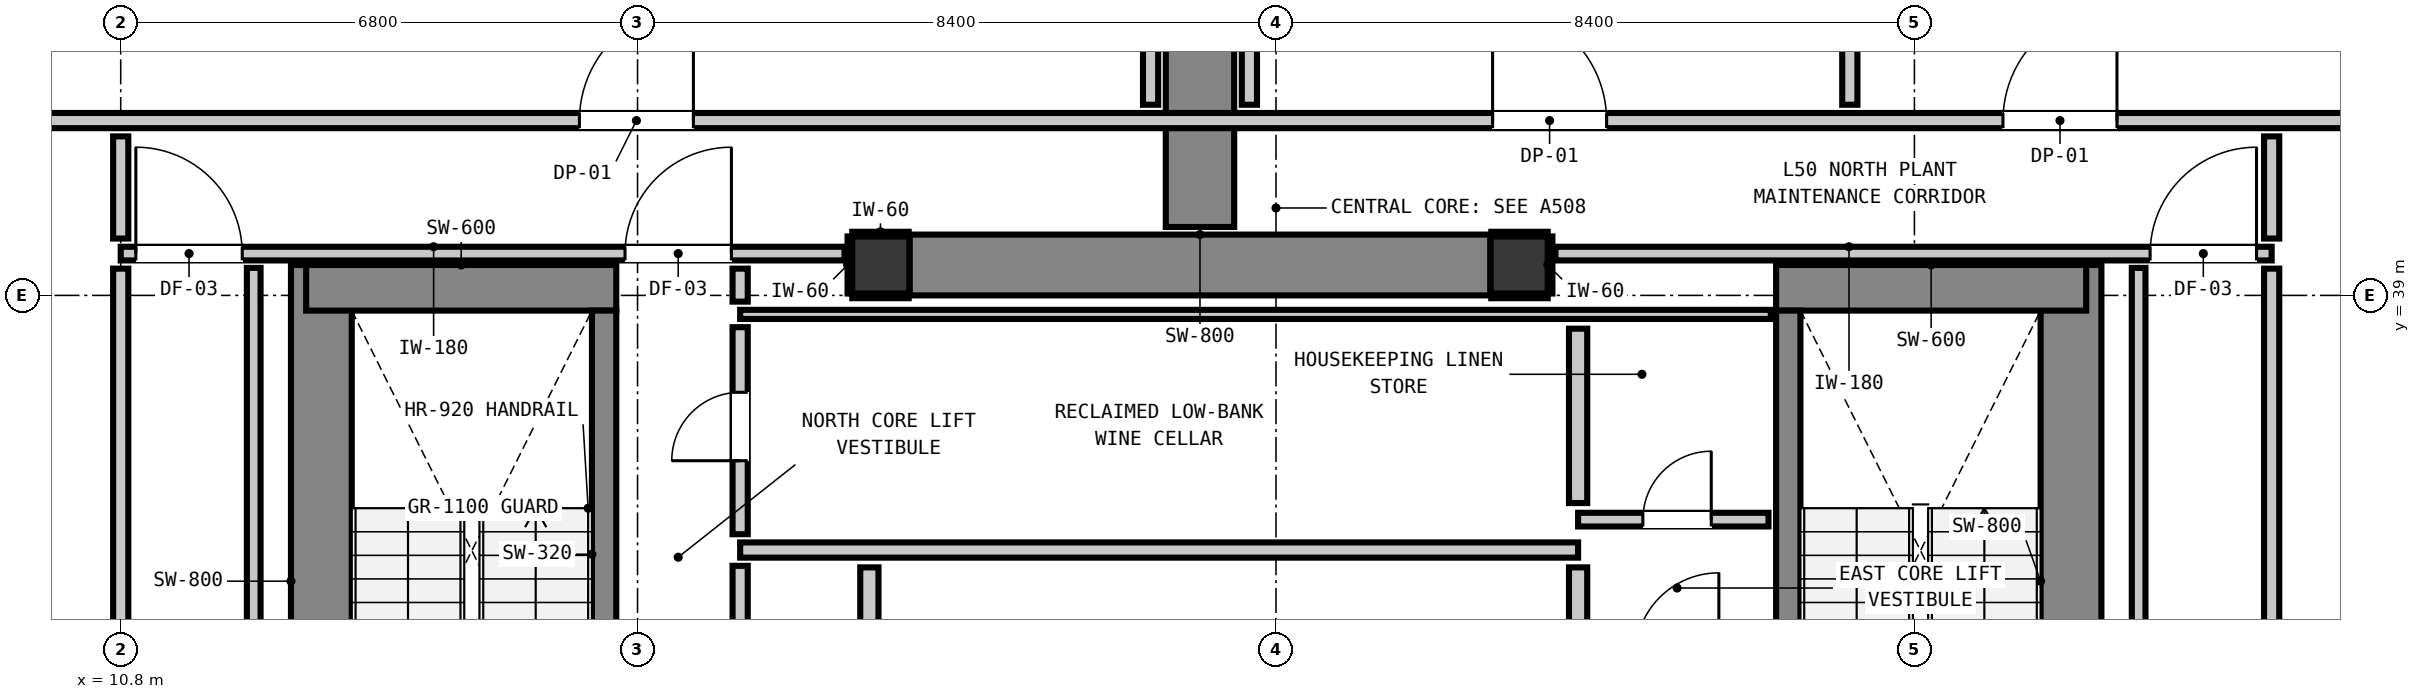
"""IFC4 building model, lengths in metres.
Left out: names, types, materials, properties, quantities, classifications, styles, units other than length and angle.
Written with IfcOpenShell. Run it as: python <this file> out.ifc"""

import sys

from ifc_helpers import new_model, si_unit, direction, frame, frame_2d, origin, origin_2d, place, context, subcontext, project, spatial, rectangle, extrude, element, fill, save


model = new_model("IFC4")
c1 = context("Model", 3, precision=1e-05, world=origin(), true_north=direction((0.0, 1.0)))
c2 = subcontext(c1, "Body", "Model", "MODEL_VIEW")
j1 = project(units=[si_unit("LENGTHUNIT", "METRE"), si_unit("PLANEANGLEUNIT", "RADIAN")], contexts=[c1])
p1 = place(None, origin())
s1 = spatial("IfcSite", under=j1, at=p1, CompositionType="ELEMENT")
p2 = place(p1, origin())
s2 = spatial("IfcBuilding", under=s1, at=p2, CompositionType="ELEMENT")
p3 = place(p2, frame((0.0, 0.0, 172.48)))
s3 = spatial("IfcBuildingStorey", under=s2, at=p3, CompositionType="ELEMENT", Elevation=172.48)
for number, where, z_axis, x_axis in (
    (1, (20.8, 39.4, 0.0), (0.0, 0.0, 1.0), (1.0, 0.0, 0.0)),
    (2, (29.2, 39.4, 0.0), (0.0, 0.0, 1.0), (1.0, 0.0, 0.0)),
):
    element("IfcColumn", number, at=place(p3, frame(where, z_axis=z_axis, x_axis=x_axis)), inside=s3, PredefinedType="COLUMN", context=c2, shape_type="SweptSolid", body=[
        extrude(rectangle(XDim=0.75, YDim=0.75, at=origin_2d()), origin(), (0.0, 0.0, 1.0), 4.4),
    ])
p4 = place(p3, frame((13.44, 31.08, 0.0), z_axis=(0.0, 0.0, 1.0), x_axis=(0.0, 1.0, 0.0)))
e3 = element("IfcWall", 3, at=p4, inside=s3, PredefinedType="SHEAR", context=c2, shape_type="SweptSolid", body=[
    extrude(rectangle(XDim=8.32, YDim=0.8, at=frame_2d((4.16, 0.0))), origin(), (0.0, 0.0, 1.0), 4.4),
])
p5 = place(p3, frame((13.24, 39.1, 0.0), z_axis=(0.0, 0.0, 1.0), x_axis=(1.0, 0.0, 0.0)))
e4 = element("IfcWall", 4, at=p5, inside=s3, PredefinedType="SHEAR", context=c2, shape_type="SweptSolid", body=[
    extrude(rectangle(XDim=4.08, YDim=0.6, at=frame_2d((2.04, 0.0))), origin(), (0.0, 0.0, 1.0), 4.4),
])
p6 = place(p3, frame((36.46, 31.08, 0.0), z_axis=(0.0, 0.0, 1.0), x_axis=(0.0, 1.0, 0.0)))
e5 = element("IfcWall", 5, at=p6, inside=s3, PredefinedType="SHEAR", context=c2, shape_type="SweptSolid", body=[
    extrude(rectangle(XDim=8.32, YDim=0.8, at=frame_2d((4.16, 0.0))), origin(), (0.0, 0.0, 1.0), 4.4),
])
p7 = place(p3, frame((32.58, 39.1, 0.0), z_axis=(0.0, 0.0, 1.0), x_axis=(1.0, 0.0, 0.0)))
e6 = element("IfcWall", 6, at=p7, inside=s3, PredefinedType="SHEAR", context=c2, shape_type="SweptSolid", body=[
    extrude(rectangle(XDim=4.08, YDim=0.6, at=frame_2d((2.04, 0.0))), origin(), (0.0, 0.0, 1.0), 4.4),
])
p8 = place(p3, frame((21.18, 39.4, 0.0), z_axis=(0.0, 0.0, 1.0), x_axis=(1.0, 0.0, 0.0)))
e7 = element("IfcWall", 7, at=p8, inside=s3, PredefinedType="SHEAR", context=c2, shape_type="SweptSolid", body=[
    extrude(rectangle(XDim=7.64, YDim=0.8, at=frame_2d((3.82, 0.0))), origin(), (0.0, 0.0, 1.0), 4.4),
])
p9 = place(p3, frame((17.16, 31.0, 0.0), z_axis=(0.0, 0.0, 1.0), x_axis=(0.0, 1.0, 0.0)))
e8 = element("IfcWall", 8, at=p9, inside=s3, PredefinedType="SHEAR", context=c2, shape_type="SweptSolid", body=[
    extrude(rectangle(XDim=7.8, YDim=0.32, at=frame_2d((3.9, 0.0))), origin(), (0.0, 0.0, 1.0), 4.4),
])
p10 = place(p9, frame((0.19, 0.0, 0.0)))
e9 = element("IfcOpeningElement", 9, at=p10, cuts=e8, PredefinedType="OPENING", context=c2, shape_type="SweptSolid", body=[
    extrude(rectangle(XDim=1.1, YDim=2.15, at=frame_2d((0.55, 1.075))), frame((0.0, 0.17, 0.0), z_axis=(0.0, -1.0, 0.0), x_axis=(1.0, 0.0, 0.0)), (0.0, 0.0, 1.0), 0.34),
])
p11 = place(p3, frame((32.74, 31.0, 0.0), z_axis=(0.0, 0.0, 1.0), x_axis=(0.0, 1.0, 0.0)))
e10 = element("IfcWall", 10, at=p11, inside=s3, PredefinedType="SHEAR", context=c2, shape_type="SweptSolid", body=[
    extrude(rectangle(XDim=7.8, YDim=0.32, at=frame_2d((3.9, 0.0))), origin(), (0.0, 0.0, 1.0), 4.4),
])
p12 = place(p11, frame((0.19, 0.0, 0.0)))
e11 = element("IfcOpeningElement", 11, at=p12, cuts=e10, PredefinedType="OPENING", context=c2, shape_type="SweptSolid", body=[
    extrude(rectangle(XDim=1.1, YDim=2.15, at=frame_2d((0.55, 1.075))), frame((0.0, 0.17, 0.0), z_axis=(0.0, -1.0, 0.0), x_axis=(1.0, 0.0, 0.0)), (0.0, 0.0, 1.0), 0.34),
])
p13 = place(p3, frame((25.0, 39.9, 0.0), z_axis=(0.0, 0.0, 1.0), x_axis=(0.0, 1.0, 0.0)))
e12 = element("IfcWall", 12, at=p13, inside=s3, PredefinedType="SHEAR", context=c2, shape_type="SweptSolid", body=[
    extrude(rectangle(XDim=11.05, YDim=0.9, at=frame_2d((5.525, 0.0))), origin(), (0.0, 0.0, 1.0), 4.16),
])
p14 = place(p3, frame((18.95, 35.65, 0.0), z_axis=(0.0, 0.0, 1.0), x_axis=(1.0, 0.0, 0.0)))
e13 = element("IfcWall", 13, at=p14, inside=s3, PredefinedType="PARTITIONING", context=c2, shape_type="SweptSolid", body=[
    extrude(rectangle(XDim=11.025, YDim=0.2, at=frame_2d((5.513, 0.0))), origin(), (0.0, 0.0, 1.0), 4.16),
])
p15 = place(p3, frame((4.35, 41.3, 0.0), z_axis=(0.0, 0.0, 1.0), x_axis=(1.0, 0.0, 0.0)))
e14 = element("IfcWall", 14, at=p15, inside=s3, PredefinedType="PARTITIONING", context=c2, shape_type="SweptSolid", body=[
    extrude(rectangle(XDim=37.1, YDim=0.2, at=frame_2d((18.55, 0.0))), origin(), (0.0, 0.0, 1.0), 4.16),
])
p16 = place(p15, frame((24.5, 0.0, 0.0)))
e15 = element("IfcOpeningElement", 15, at=p16, cuts=e14, PredefinedType="OPENING", context=c2, shape_type="SweptSolid", body=[
    extrude(rectangle(XDim=1.5, YDim=2.15, at=frame_2d((0.75, 1.075))), frame((0.0, 0.11, 0.0), z_axis=(0.0, -1.0, 0.0), x_axis=(1.0, 0.0, 0.0)), (0.0, 0.0, 1.0), 0.22),
])
p17 = place(p15, frame((31.215, 0.0, 0.0)))
e16 = element("IfcOpeningElement", 16, at=p17, cuts=e14, PredefinedType="OPENING", context=c2, shape_type="SweptSolid", body=[
    extrude(rectangle(XDim=1.5, YDim=2.15, at=frame_2d((0.75, 1.075))), frame((0.0, 0.11, 0.0), z_axis=(0.0, -1.0, 0.0), x_axis=(1.0, 0.0, 0.0)), (0.0, 0.0, 1.0), 0.22),
])
p18 = place(p15, frame((12.485, 0.0, 0.0)))
e17 = element("IfcOpeningElement", 17, at=p18, cuts=e14, PredefinedType="OPENING", context=c2, shape_type="SweptSolid", body=[
    extrude(rectangle(XDim=1.5, YDim=2.15, at=frame_2d((0.75, 1.075))), frame((0.0, 0.11, 0.0), z_axis=(0.0, -1.0, 0.0), x_axis=(1.0, 0.0, 0.0)), (0.0, 0.0, 1.0), 0.22),
])
p19 = place(p3, frame((29.975, 36.05, 0.0), z_axis=(0.0, 0.0, 1.0), x_axis=(1.0, 0.0, 0.0)))
e18 = element("IfcWall", 18, at=p19, inside=s3, PredefinedType="PARTITIONING", context=c2, shape_type="SweptSolid", body=[
    extrude(rectangle(XDim=2.505, YDim=0.18, at=frame_2d((1.252, 0.0))), origin(), (0.0, 0.0, 1.0), 4.16),
])
p20 = place(p19, frame((0.852, 0.0, 0.0)))
e19 = element("IfcOpeningElement", 19, at=p20, cuts=e18, PredefinedType="OPENING", context=c2, shape_type="SweptSolid", body=[
    extrude(rectangle(XDim=0.9, YDim=2.1, at=frame_2d((0.45, 1.05))), frame((0.0, 0.1, 0.0), z_axis=(0.0, -1.0, 0.0), x_axis=(1.0, 0.0, 0.0)), (0.0, 0.0, 1.0), 0.2),
])
p21 = place(p3, frame((10.8, 39.55, 0.0), z_axis=(0.0, 0.0, 1.0), x_axis=(1.0, 0.0, 0.0)))
e20 = element("IfcWall", 20, at=p21, inside=s3, PredefinedType="PARTITIONING", context=c2, shape_type="SweptSolid", body=[
    extrude(rectangle(XDim=9.523, YDim=0.18, at=frame_2d((4.761, 0.0))), origin(), (0.0, 0.0, 1.0), 3.842),
])
p22 = place(p21, frame((6.635, 0.0, 0.0)))
e21 = element("IfcOpeningElement", 21, at=p22, cuts=e20, PredefinedType="OPENING", context=c2, shape_type="SweptSolid", body=[
    extrude(rectangle(XDim=1.4, YDim=2.15, at=frame_2d((0.7, 1.075))), frame((0.0, 0.1, 0.0), z_axis=(0.0, -1.0, 0.0), x_axis=(1.0, 0.0, 0.0)), (0.0, 0.0, 1.0), 0.2),
])
p23 = place(p21, frame((0.199, 0.0, 0.0)))
e22 = element("IfcOpeningElement", 22, at=p23, cuts=e20, PredefinedType="OPENING", context=c2, shape_type="SweptSolid", body=[
    extrude(rectangle(XDim=1.4, YDim=2.15, at=frame_2d((0.7, 1.075))), frame((0.0, 0.1, 0.0), z_axis=(0.0, -1.0, 0.0), x_axis=(1.0, 0.0, 0.0)), (0.0, 0.0, 1.0), 0.2),
])
p24 = place(p3, frame((29.677, 39.55, 0.0), z_axis=(0.0, 0.0, 1.0), x_axis=(1.0, 0.0, 0.0)))
e23 = element("IfcWall", 23, at=p24, inside=s3, PredefinedType="PARTITIONING", context=c2, shape_type="SweptSolid", body=[
    extrude(rectangle(XDim=9.423, YDim=0.18, at=frame_2d((4.711, 0.0))), origin(), (0.0, 0.0, 1.0), 3.842),
])
p25 = place(p24, frame((7.824, 0.0, 0.0)))
e24 = element("IfcOpeningElement", 24, at=p25, cuts=e23, PredefinedType="OPENING", context=c2, shape_type="SweptSolid", body=[
    extrude(rectangle(XDim=1.4, YDim=2.15, at=frame_2d((0.7, 1.075))), frame((0.0, 0.1, 0.0), z_axis=(0.0, -1.0, 0.0), x_axis=(1.0, 0.0, 0.0)), (0.0, 0.0, 1.0), 0.2),
])
p26 = place(p3, frame((18.95, 38.75, 0.0), z_axis=(0.0, 0.0, 1.0), x_axis=(1.0, 0.0, 0.0)))
e25 = element("IfcWall", 25, at=p26, inside=s3, PredefinedType="PARTITIONING", context=c2, shape_type="SweptSolid", body=[
    extrude(rectangle(XDim=13.56, YDim=0.12, at=frame_2d((6.78, 0.0))), origin(), (0.0, 0.0, 1.0), 4.16),
])
p27 = place(p3, frame((20.65, 33.148, 0.0), z_axis=(0.0, 0.0, 1.0), x_axis=(0.0, 1.0, 0.0)))
e26 = element("IfcWall", 26, at=p27, inside=s3, PredefinedType="PARTITIONING", context=c2, shape_type="SweptSolid", body=[
    extrude(rectangle(XDim=2.274, YDim=0.24, at=frame_2d((1.137, 0.0))), origin(), (0.0, 0.0, 1.0), 3.395),
])
p28 = place(p3, frame((29.975, 34.498, 0.0), z_axis=(0.0, 0.0, 1.0), x_axis=(0.0, 1.0, 0.0)))
e27 = element("IfcWall", 27, at=p28, inside=s3, PredefinedType="PARTITIONING", context=c2, shape_type="SweptSolid", body=[
    extrude(rectangle(XDim=0.924, YDim=0.24, at=frame_2d((0.462, 0.0))), origin(), (0.0, 0.0, 1.0), 4.16),
])
p29 = place(p3, frame((29.975, 36.268, 0.0), z_axis=(0.0, 0.0, 1.0), x_axis=(0.0, 1.0, 0.0)))
e28 = element("IfcWall", 28, at=p29, inside=s3, PredefinedType="PARTITIONING", context=c2, shape_type="SweptSolid", body=[
    extrude(rectangle(XDim=2.294, YDim=0.24, at=frame_2d((1.147, 0.0))), origin(), (0.0, 0.0, 1.0), 4.16),
])
p30 = place(p3, frame((10.8, 30.008, 0.0), z_axis=(0.0, 0.0, 1.0), x_axis=(0.0, 1.0, 0.0)))
e29 = element("IfcWall", 29, at=p30, inside=s3, PredefinedType="PARTITIONING", context=c2, shape_type="SweptSolid", body=[
    extrude(rectangle(XDim=9.344, YDim=0.2, at=frame_2d((4.672, 0.0))), origin(), (0.0, 0.0, 1.0), 4.16),
])
p31 = place(p3, frame((10.8, 39.748, 0.0), z_axis=(0.0, 0.0, 1.0), x_axis=(0.0, 1.0, 0.0)))
e30 = element("IfcWall", 30, at=p31, inside=s3, PredefinedType="PARTITIONING", context=c2, shape_type="SweptSolid", body=[
    extrude(rectangle(XDim=1.344, YDim=0.2, at=frame_2d((0.672, 0.0))), origin(), (0.0, 0.0, 1.0), 4.16),
])
p32 = place(p3, frame((18.95, 33.128, 0.0), z_axis=(0.0, 0.0, 1.0), x_axis=(0.0, 1.0, 0.0)))
e31 = element("IfcWall", 31, at=p32, inside=s3, PredefinedType="PARTITIONING", context=c2, shape_type="SweptSolid", body=[
    extrude(rectangle(XDim=2.314, YDim=0.2, at=frame_2d((1.157, 0.0))), origin(), (0.0, 0.0, 1.0), 4.16),
])
p33 = place(p3, frame((18.95, 35.858, 0.0), z_axis=(0.0, 0.0, 1.0), x_axis=(0.0, 1.0, 0.0)))
e32 = element("IfcWall", 32, at=p33, inside=s3, PredefinedType="PARTITIONING", context=c2, shape_type="SweptSolid", body=[
    extrude(rectangle(XDim=2.724, YDim=0.2, at=frame_2d((1.362, 0.0))), origin(), (0.0, 0.0, 1.0), 4.16),
])
p34 = place(p33, frame((0.967, 0.0, 0.0)))
e33 = element("IfcOpeningElement", 33, at=p34, cuts=e32, PredefinedType="OPENING", context=c2, shape_type="SweptSolid", body=[
    extrude(rectangle(XDim=0.9, YDim=2.1, at=frame_2d((0.45, 1.05))), frame((0.0, 0.11, 0.0), z_axis=(0.0, -1.0, 0.0), x_axis=(1.0, 0.0, 0.0)), (0.0, 0.0, 1.0), 0.22),
])
p35 = place(p3, frame((18.95, 38.918, 0.0), z_axis=(0.0, 0.0, 1.0), x_axis=(0.0, 1.0, 0.0)))
e34 = element("IfcWall", 34, at=p35, inside=s3, PredefinedType="PARTITIONING", context=c2, shape_type="SweptSolid", body=[
    extrude(rectangle(XDim=0.434, YDim=0.2, at=frame_2d((0.217, 0.0))), origin(), (0.0, 0.0, 1.0), 4.16),
])
for number, where, z_axis, x_axis in (
    (35, (24.35, 41.508, 0.0), (0.0, 0.0, 1.0), (0.0, 1.0, 0.0)),
    (36, (25.65, 41.508, 0.0), (0.0, 0.0, 1.0), (0.0, 1.0, 0.0)),
    (37, (33.55, 41.508, 0.0), (0.0, 0.0, 1.0), (0.0, 1.0, 0.0)),
):
    element("IfcWall", number, at=place(p3, frame(where, z_axis=z_axis, x_axis=x_axis)), inside=s3, PredefinedType="PARTITIONING", context=c2, shape_type="SweptSolid", body=[
        extrude(rectangle(XDim=9.134, YDim=0.2, at=frame_2d((4.567, 0.0))), origin(), (0.0, 0.0, 1.0), 4.16),
    ])
p36 = place(p3, frame((39.1, 30.008, 0.0), z_axis=(0.0, 0.0, 1.0), x_axis=(0.0, 1.0, 0.0)))
e38 = element("IfcWall", 38, at=p36, inside=s3, PredefinedType="PARTITIONING", context=c2, shape_type="SweptSolid", body=[
    extrude(rectangle(XDim=9.344, YDim=0.2, at=frame_2d((4.672, 0.0))), origin(), (0.0, 0.0, 1.0), 4.16),
])
p37 = place(p3, frame((39.1, 39.748, 0.0), z_axis=(0.0, 0.0, 1.0), x_axis=(0.0, 1.0, 0.0)))
e39 = element("IfcWall", 39, at=p37, inside=s3, PredefinedType="PARTITIONING", context=c2, shape_type="SweptSolid", body=[
    extrude(rectangle(XDim=1.344, YDim=0.2, at=frame_2d((0.672, 0.0))), origin(), (0.0, 0.0, 1.0), 4.16),
])
for number, where, z_axis, x_axis in (
    (40, (12.55, 22.068, 0.0), (0.0, 0.0, 1.0), (0.0, 1.0, 0.0)),
    (41, (37.35, 22.068, 0.0), (0.0, 0.0, 1.0), (0.0, 1.0, 0.0)),
):
    element("IfcWall", number, at=place(p3, frame(where, z_axis=z_axis, x_axis=x_axis)), inside=s3, PredefinedType="PARTITIONING", context=c2, shape_type="SweptSolid", body=[
        extrude(rectangle(XDim=17.294, YDim=0.18, at=frame_2d((8.647, 0.0))), origin(), (0.0, 0.0, 1.0), 4.16),
    ])
for number, where, z_axis, x_axis in (
    (42, (20.425, 38.993, 0.0), (0.0, 0.0, 1.0), (1.0, 0.0, 0.0)),
    (43, (20.425, 39.807, 0.0), (0.0, 0.0, 1.0), (1.0, 0.0, 0.0)),
):
    element("IfcWall", number, at=place(p3, frame(where, z_axis=z_axis, x_axis=x_axis)), inside=s3, PredefinedType="PARTITIONING", context=c2, shape_type="SweptSolid", body=[
        extrude(rectangle(XDim=0.742, YDim=0.06, at=frame_2d((0.371, 0.0))), origin(), (0.0, 0.0, 1.0), 1.45),
    ])
p38 = place(p3, frame((20.393, 39.025, 0.0), z_axis=(0.0, 0.0, 1.0), x_axis=(0.0, 1.0, 0.0)))
e44 = element("IfcWall", 44, at=p38, inside=s3, PredefinedType="PARTITIONING", context=c2, shape_type="SweptSolid", body=[
    extrude(rectangle(XDim=0.75, YDim=0.06, at=frame_2d((0.375, 0.0))), origin(), (0.0, 0.0, 1.0), 1.45),
])
for number, where, z_axis, x_axis in (
    (45, (28.833, 38.993, 0.0), (0.0, 0.0, 1.0), (1.0, 0.0, 0.0)),
    (46, (28.833, 39.807, 0.0), (0.0, 0.0, 1.0), (1.0, 0.0, 0.0)),
):
    element("IfcWall", number, at=place(p3, frame(where, z_axis=z_axis, x_axis=x_axis)), inside=s3, PredefinedType="PARTITIONING", context=c2, shape_type="SweptSolid", body=[
        extrude(rectangle(XDim=0.742, YDim=0.06, at=frame_2d((0.371, 0.0))), origin(), (0.0, 0.0, 1.0), 1.45),
    ])
p39 = place(p3, frame((29.607, 39.025, 0.0), z_axis=(0.0, 0.0, 1.0), x_axis=(0.0, 1.0, 0.0)))
e47 = element("IfcWall", 47, at=p39, inside=s3, PredefinedType="PARTITIONING", context=c2, shape_type="SweptSolid", body=[
    extrude(rectangle(XDim=0.75, YDim=0.06, at=frame_2d((0.375, 0.0))), origin(), (0.0, 0.0, 1.0), 1.45),
])
p40 = place(p22, origin())
e48 = element("IfcDoor", 48, at=p40, inside=s3, OperationType="SINGLE_SWING_RIGHT", PredefinedType="DOOR", context=c2, shape_type="SweptSolid", body=[
    extrude(rectangle(XDim=1.4, YDim=2.15, at=frame_2d((0.7, 1.075))), frame((0.0, 0.025, 0.0), z_axis=(0.0, -1.0, 0.0), x_axis=(1.0, 0.0, 0.0)), (0.0, 0.0, 1.0), 0.05),
])
fill(e21, e48)
p41 = place(p23, origin())
e49 = element("IfcDoor", 49, at=p41, inside=s3, OperationType="SINGLE_SWING_LEFT", PredefinedType="DOOR", context=c2, shape_type="SweptSolid", body=[
    extrude(rectangle(XDim=1.4, YDim=2.15, at=frame_2d((0.7, 1.075))), frame((0.0, 0.025, 0.0), z_axis=(0.0, -1.0, 0.0), x_axis=(1.0, 0.0, 0.0)), (0.0, 0.0, 1.0), 0.05),
])
fill(e22, e49)
p42 = place(p25, origin())
e50 = element("IfcDoor", 50, at=p42, inside=s3, OperationType="SINGLE_SWING_RIGHT", PredefinedType="DOOR", context=c2, shape_type="SweptSolid", body=[
    extrude(rectangle(XDim=1.4, YDim=2.15, at=frame_2d((0.7, 1.075))), frame((0.0, 0.025, 0.0), z_axis=(0.0, -1.0, 0.0), x_axis=(1.0, 0.0, 0.0)), (0.0, 0.0, 1.0), 0.05),
])
fill(e24, e50)
p43 = place(p20, origin())
e51 = element("IfcDoor", 51, at=p43, inside=s3, OperationType="SINGLE_SWING_RIGHT", PredefinedType="DOOR", context=c2, shape_type="SweptSolid", body=[
    extrude(rectangle(XDim=0.9, YDim=2.1, at=frame_2d((0.45, 1.05))), frame((0.0, 0.025, 0.0), z_axis=(0.0, -1.0, 0.0), x_axis=(1.0, 0.0, 0.0)), (0.0, 0.0, 1.0), 0.05),
])
fill(e19, e51)
p44 = place(p34, origin())
e52 = element("IfcDoor", 52, at=p44, inside=s3, OperationType="SINGLE_SWING_LEFT", PredefinedType="DOOR", context=c2, shape_type="SweptSolid", body=[
    extrude(rectangle(XDim=0.9, YDim=2.1, at=frame_2d((0.45, 1.05))), frame((0.0, 0.025, 0.0), z_axis=(0.0, -1.0, 0.0), x_axis=(1.0, 0.0, 0.0)), (0.0, 0.0, 1.0), 0.05),
])
fill(e33, e52)
p45 = place(p16, origin())
e53 = element("IfcDoor", 53, at=p45, inside=s3, OperationType="SINGLE_SWING_LEFT", PredefinedType="DOOR", context=c2, shape_type="SweptSolid", body=[
    extrude(rectangle(XDim=1.5, YDim=2.15, at=frame_2d((0.75, 1.075))), frame((0.0, 0.025, 0.0), z_axis=(0.0, -1.0, 0.0), x_axis=(1.0, 0.0, 0.0)), (0.0, 0.0, 1.0), 0.05),
])
fill(e15, e53)
p46 = place(p17, origin())
e54 = element("IfcDoor", 54, at=p46, inside=s3, OperationType="SINGLE_SWING_RIGHT", PredefinedType="DOOR", context=c2, shape_type="SweptSolid", body=[
    extrude(rectangle(XDim=1.5, YDim=2.15, at=frame_2d((0.75, 1.075))), frame((0.0, 0.025, 0.0), z_axis=(0.0, -1.0, 0.0), x_axis=(1.0, 0.0, 0.0)), (0.0, 0.0, 1.0), 0.05),
])
fill(e16, e54)
p47 = place(p18, origin())
e55 = element("IfcDoor", 55, at=p47, inside=s3, OperationType="SINGLE_SWING_RIGHT", PredefinedType="DOOR", context=c2, shape_type="SweptSolid", body=[
    extrude(rectangle(XDim=1.5, YDim=2.15, at=frame_2d((0.75, 1.075))), frame((0.0, 0.025, 0.0), z_axis=(0.0, -1.0, 0.0), x_axis=(1.0, 0.0, 0.0)), (0.0, 0.0, 1.0), 0.05),
])
fill(e17, e55)
save(model, sys.argv[1])
